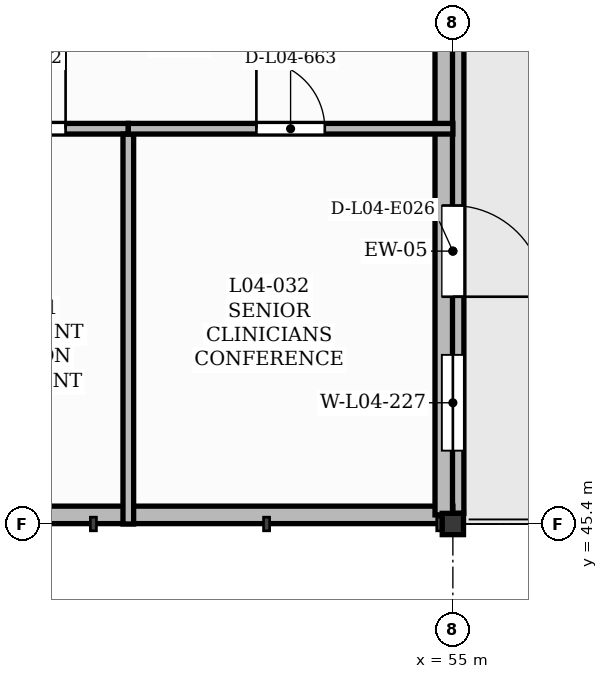
"""IFC4 building model, lengths in metres.
Left out: names, types, materials, properties, quantities, classifications, styles, units other than length and angle.
Written with IfcOpenShell. Run it as: python <this file> out.ifc"""

import sys

from ifc_helpers import new_model, si_unit, direction, frame, frame_2d, origin, origin_2d, place, context, subcontext, project, spatial, polyline, rectangle, outline, extrude, element, fill, save


model = new_model("IFC4")
c1 = context("Model", 3, precision=1e-05, world=origin(), true_north=direction((0.0, 1.0)))
c2 = subcontext(c1, "Body", "Model", "MODEL_VIEW")
j1 = project(units=[si_unit("LENGTHUNIT", "METRE"), si_unit("PLANEANGLEUNIT", "RADIAN")], contexts=[c1])
p1 = place(None, origin())
s1 = spatial("IfcSite", under=j1, at=p1, CompositionType="ELEMENT")
p2 = place(p1, origin())
s2 = spatial("IfcBuilding", under=s1, at=p2, CompositionType="ELEMENT")
p3 = place(p2, frame((0.0, 0.0, 17.4)))
s3 = spatial("IfcBuildingStorey", under=s2, at=p3, CompositionType="ELEMENT", Elevation=17.4)
p4 = place(p3, frame((55.0, 45.4, 0.0), z_axis=(0.0, 0.0, 1.0), x_axis=(1.0, 0.0, 0.0)))
e1 = element("IfcColumn", 1, at=p4, inside=s3, PredefinedType="COLUMN", context=c2, shape_type="SweptSolid", body=[
    extrude(rectangle(XDim=0.28, YDim=0.28, at=origin_2d()), origin(), (0.0, 0.0, 1.0), 3.95),
])
p5 = place(p3, frame((55.0, 45.54, 0.0), z_axis=(0.0, 0.0, 1.0), x_axis=(0.0, 1.0, 0.0)))
e2 = element("IfcWall", 2, at=p5, inside=s3, PredefinedType="SOLIDWALL", context=c2, shape_type="SweptSolid", body=[
    extrude(rectangle(XDim=6.9, YDim=0.29, at=frame_2d((3.45, 0.0))), origin(), (0.0, 0.0, 1.0), 3.49),
])
p6 = place(p5, frame((2.85, 0.0, 0.0)))
e3 = element("IfcOpeningElement", 3, at=p6, cuts=e2, PredefinedType="OPENING", context=c2, shape_type="SweptSolid", body=[
    extrude(rectangle(XDim=1.2, YDim=2.25, at=frame_2d((0.6, 1.125))), frame((0.0, 0.155, 0.0), z_axis=(0.0, -1.0, 0.0), x_axis=(1.0, 0.0, 0.0)), (0.0, 0.0, 1.0), 0.31),
])
p7 = place(p5, frame((0.825, 0.0, 1.05)))
e4 = element("IfcOpeningElement", 4, at=p7, cuts=e2, PredefinedType="OPENING", context=c2, shape_type="SweptSolid", body=[
    extrude(rectangle(XDim=1.26, YDim=1.65, at=frame_2d((0.63, 0.825))), frame((0.0, 0.155, 0.0), z_axis=(0.0, -1.0, 0.0), x_axis=(1.0, 0.0, 0.0)), (0.0, 0.0, 1.0), 0.31),
])
p8 = place(p3, frame((4.6, 45.52, 4.2), z_axis=(0.0, 0.0, 1.0), x_axis=(1.0, 0.0, 0.0)))
e5 = element("IfcWall", 5, at=p8, inside=s3, PredefinedType="PARAPET", context=c2, shape_type="SweptSolid", body=[
    extrude(outline(polyline([(0.0, 0.0), (50.4, 0.0), (50.4, 0.6), (39.312, 0.85), (39.312, 0.6), (32.256, 1.1), (32.256, 0.85), (18.144, 1.1), (18.144, 0.85), (11.088, 0.85), (11.088, 0.6), (0.0, 0.6), (0.0, 0.0)])), frame((0.0, 0.115, 0.0), z_axis=(0.0, -1.0, 0.0), x_axis=(1.0, 0.0, 0.0)), (0.0, 0.0, 1.0), 0.23),
])
p9 = place(p3, frame((54.88, 45.52, 4.2), z_axis=(0.0, 0.0, 1.0), x_axis=(0.0, 1.0, 0.0)))
e6 = element("IfcWall", 6, at=p9, inside=s3, PredefinedType="PARAPET", context=c2, shape_type="SweptSolid", body=[
    extrude(outline(polyline([(0.0, 0.0), (14.16, 0.0), (14.16, 0.6), (11.045, 0.85), (11.045, 0.6), (9.062, 1.1), (9.062, 0.85), (5.098, 1.1), (5.098, 0.85), (3.115, 0.85), (3.115, 0.6), (0.0, 0.6), (0.0, 0.0)])), frame((0.0, 0.115, 0.0), z_axis=(0.0, -1.0, 0.0), x_axis=(1.0, 0.0, 0.0)), (0.0, 0.0, 1.0), 0.23),
])
p10 = place(p3, frame((47.8, 50.6, 0.0), z_axis=(0.0, 0.0, 1.0), x_axis=(1.0, 0.0, 0.0)))
e7 = element("IfcWall", 7, at=p10, inside=s3, PredefinedType="PARTITIONING", context=c2, shape_type="SweptSolid", body=[
    extrude(rectangle(XDim=2.93, YDim=0.14, at=frame_2d((1.465, 0.0))), origin(), (0.0, 0.0, 1.0), 3.93),
])
p11 = place(p10, frame((0.825, 0.0, 0.0)))
e8 = element("IfcOpeningElement", 8, at=p11, cuts=e7, PredefinedType="OPENING", context=c2, shape_type="SweptSolid", body=[
    extrude(rectangle(XDim=1.28, YDim=2.2, at=frame_2d((0.64, 1.1))), frame((0.0, 0.08, 0.0), z_axis=(0.0, -1.0, 0.0), x_axis=(1.0, 0.0, 0.0)), (0.0, 0.0, 1.0), 0.16),
])
p12 = place(p3, frame((50.73, 45.4, 0.0), z_axis=(0.0, 0.0, 1.0), x_axis=(0.0, 1.0, 0.0)))
e9 = element("IfcWall", 9, at=p12, inside=s3, PredefinedType="PARTITIONING", context=c2, shape_type="SweptSolid", body=[
    extrude(rectangle(XDim=5.13, YDim=0.14, at=frame_2d((2.565, 0.0))), origin(), (0.0, 0.0, 1.0), 3.93),
])
p13 = place(p3, frame((50.73, 50.6, 0.0), z_axis=(0.0, 0.0, 1.0), x_axis=(1.0, 0.0, 0.0)))
e10 = element("IfcWall", 10, at=p13, inside=s3, PredefinedType="PARTITIONING", context=c2, shape_type="SweptSolid", body=[
    extrude(rectangle(XDim=4.27, YDim=0.14, at=frame_2d((2.135, 0.0))), origin(), (0.0, 0.0, 1.0), 3.93),
])
p14 = place(p13, frame((1.685, 0.0, 0.0)))
e11 = element("IfcOpeningElement", 11, at=p14, cuts=e10, PredefinedType="OPENING", context=c2, shape_type="SweptSolid", body=[
    extrude(rectangle(XDim=0.9, YDim=2.1, at=frame_2d((0.45, 1.05))), frame((0.0, 0.08, 0.0), z_axis=(0.0, -1.0, 0.0), x_axis=(1.0, 0.0, 0.0)), (0.0, 0.0, 1.0), 0.16),
])
p15 = place(p6, frame((1.2, 0.0, 0.0), z_axis=(0.0, 0.0, 1.0), x_axis=(-1.0, 0.0, 0.0)))
e12 = element("IfcDoor", 12, at=p15, inside=s3, OperationType="SINGLE_SWING_RIGHT", PredefinedType="DOOR", context=c2, shape_type="SweptSolid", body=[
    extrude(rectangle(XDim=1.2, YDim=2.25, at=frame_2d((0.6, 1.125))), frame((0.0, 0.025, 0.0), z_axis=(0.0, -1.0, 0.0), x_axis=(1.0, 0.0, 0.0)), (0.0, 0.0, 1.0), 0.05),
])
fill(e3, e12)
p16 = place(p7, origin())
e13 = element("IfcWindow", 13, at=p16, inside=s3, PartitioningType="SINGLE_PANEL", PredefinedType="WINDOW", context=c2, shape_type="SweptSolid", body=[
    extrude(rectangle(XDim=1.26, YDim=1.65, at=frame_2d((0.63, 0.825))), frame((0.0, 0.03, 0.0), z_axis=(0.0, -1.0, 0.0), x_axis=(1.0, 0.0, 0.0)), (0.0, 0.0, 1.0), 0.06),
])
fill(e4, e13)
p17 = place(p11, origin())
e14 = element("IfcDoor", 14, at=p17, inside=s3, OperationType="SINGLE_SWING_RIGHT", PredefinedType="DOOR", context=c2, shape_type="SweptSolid", body=[
    extrude(rectangle(XDim=1.28, YDim=2.2, at=frame_2d((0.64, 1.1))), frame((0.0, 0.025, 0.0), z_axis=(0.0, -1.0, 0.0), x_axis=(1.0, 0.0, 0.0)), (0.0, 0.0, 1.0), 0.05),
])
fill(e8, e14)
p18 = place(p14, origin())
e15 = element("IfcDoor", 15, at=p18, inside=s3, OperationType="SINGLE_SWING_LEFT", PredefinedType="DOOR", context=c2, shape_type="SweptSolid", body=[
    extrude(rectangle(XDim=0.9, YDim=2.1, at=frame_2d((0.45, 1.05))), frame((0.0, 0.025, 0.0), z_axis=(0.0, -1.0, 0.0), x_axis=(1.0, 0.0, 0.0)), (0.0, 0.0, 1.0), 0.05),
])
fill(e11, e15)
save(model, sys.argv[1])
